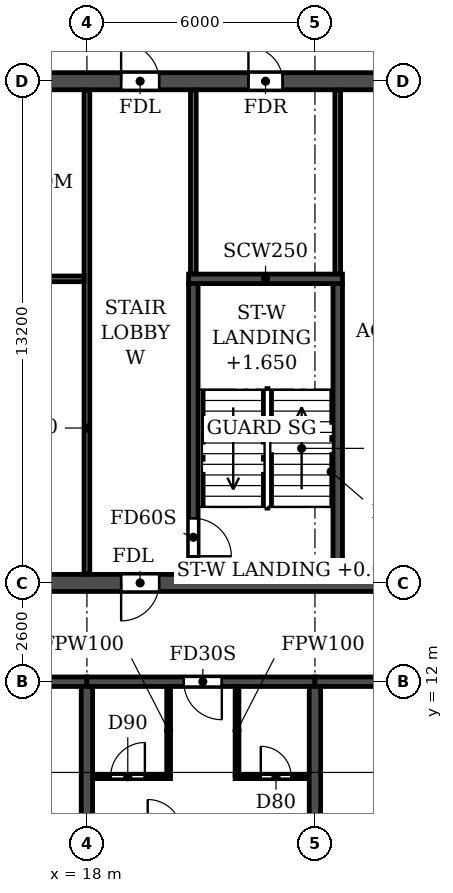
"""IFC4 building model, lengths in metres.
Left out: names, types, materials, properties, quantities, classifications, styles, units other than length and angle.
Written with IfcOpenShell. Run it as: python <this file> out.ifc"""

import sys

from ifc_helpers import new_model, si_unit, direction, frame, frame_2d, origin, place, context, subcontext, project, spatial, rectangle, extrude, element, fill, save


model = new_model("IFC4")
c1 = context("Model", 3, precision=1e-05, world=origin(), true_north=direction((0.0, 1.0)))
c2 = subcontext(c1, "Body", "Model", "MODEL_VIEW")
j1 = project(units=[si_unit("LENGTHUNIT", "METRE"), si_unit("PLANEANGLEUNIT", "RADIAN")], contexts=[c1])
p1 = place(None, origin())
s1 = spatial("IfcSite", under=j1, at=p1, CompositionType="ELEMENT")
p2 = place(p1, origin())
s2 = spatial("IfcBuilding", under=s1, at=p2, CompositionType="ELEMENT")
p3 = place(p2, frame((0.0, 0.0, 152.1)))
s3 = spatial("IfcBuildingStorey", under=s2, at=p3, CompositionType="ELEMENT", Elevation=152.1)
for number, where, z_axis, x_axis in (
    (1, (18.0, 0.2, 0.0), (0.0, 0.0, 1.0), (0.0, 1.0, 0.0)),
    (2, (24.0, 0.2, 0.0), (0.0, 0.0, 1.0), (0.0, 1.0, 0.0)),
):
    element("IfcWall", number, at=place(p3, frame(where, z_axis=z_axis, x_axis=x_axis)), inside=s3, PredefinedType="SHEAR", context=c2, shape_type="SweptSolid", body=[
        extrude(rectangle(XDim=11.675, YDim=0.3, at=frame_2d((5.837, 0.0))), origin(), (0.0, 0.0, 1.0), 3.07),
    ])
p4 = place(p3, frame((12.2, 12.0, 0.0), z_axis=(0.0, 0.0, 1.0), x_axis=(1.0, 0.0, 0.0)))
e3 = element("IfcWall", 3, at=p4, inside=s3, PredefinedType="SHEAR", context=c2, shape_type="SweptSolid", body=[
    extrude(rectangle(XDim=5.8, YDim=0.25, at=frame_2d((2.9, 0.0))), origin(), (0.0, 0.0, 1.0), 2.47),
])
p5 = place(p4, frame((2.3, 0.0, 0.0)))
e4 = element("IfcOpeningElement", 4, at=p5, cuts=e3, PredefinedType="OPENING", context=c2, shape_type="SweptSolid", body=[
    extrude(rectangle(XDim=1.0, YDim=2.1, at=frame_2d((0.5, 1.05))), frame((0.0, 0.135, 0.0), z_axis=(0.0, -1.0, 0.0), x_axis=(1.0, 0.0, 0.0)), (0.0, 0.0, 1.0), 0.27),
])
p6 = place(p3, frame((18.0, 12.0, 0.0), z_axis=(0.0, 0.0, 1.0), x_axis=(1.0, 0.0, 0.0)))
e5 = element("IfcWall", 5, at=p6, inside=s3, PredefinedType="SHEAR", context=c2, shape_type="SweptSolid", body=[
    extrude(rectangle(XDim=6.0, YDim=0.25, at=frame_2d((3.0, 0.0))), origin(), (0.0, 0.0, 1.0), 2.47),
])
p7 = place(p6, frame((2.55, 0.0, 0.0)))
e6 = element("IfcOpeningElement", 6, at=p7, cuts=e5, PredefinedType="OPENING", context=c2, shape_type="SweptSolid", body=[
    extrude(rectangle(XDim=1.0, YDim=2.1, at=frame_2d((0.5, 1.05))), frame((0.0, 0.135, 0.0), z_axis=(0.0, -1.0, 0.0), x_axis=(1.0, 0.0, 0.0)), (0.0, 0.0, 1.0), 0.27),
])
p8 = place(p3, frame((24.0, 12.0, 0.0), z_axis=(0.0, 0.0, 1.0), x_axis=(1.0, 0.0, 0.0)))
e7 = element("IfcWall", 7, at=p8, inside=s3, PredefinedType="SHEAR", context=c2, shape_type="SweptSolid", body=[
    extrude(rectangle(XDim=6.0, YDim=0.25, at=frame_2d((3.0, 0.0))), origin(), (0.0, 0.0, 1.0), 2.47),
])
p9 = place(p8, frame((2.55, 0.0, 0.0)))
e8 = element("IfcOpeningElement", 8, at=p9, cuts=e7, PredefinedType="OPENING", context=c2, shape_type="SweptSolid", body=[
    extrude(rectangle(XDim=1.0, YDim=2.1, at=frame_2d((0.5, 1.05))), frame((0.0, 0.135, 0.0), z_axis=(0.0, -1.0, 0.0), x_axis=(1.0, 0.0, 0.0)), (0.0, 0.0, 1.0), 0.27),
])
p10 = place(p3, frame((12.2, 14.6, 0.0), z_axis=(0.0, 0.0, 1.0), x_axis=(1.0, 0.0, 0.0)))
e9 = element("IfcWall", 9, at=p10, inside=s3, PredefinedType="SOLIDWALL", context=c2, shape_type="SweptSolid", body=[
    extrude(rectangle(XDim=77.6, YDim=0.45, at=frame_2d((38.8, 0.0))), origin(), (0.0, 0.0, 1.0), 3.07),
])
p11 = place(p10, frame((2.3, 0.0, 0.0)))
e10 = element("IfcOpeningElement", 10, at=p11, cuts=e9, PredefinedType="OPENING", context=c2, shape_type="SweptSolid", body=[
    extrude(rectangle(XDim=1.0, YDim=2.1, at=frame_2d((0.5, 1.05))), frame((0.0, 0.235, 0.0), z_axis=(0.0, -1.0, 0.0), x_axis=(1.0, 0.0, 0.0)), (0.0, 0.0, 1.0), 0.47),
])
p12 = place(p10, frame((6.7, 0.0, 0.0)))
e11 = element("IfcOpeningElement", 11, at=p12, cuts=e9, PredefinedType="OPENING", context=c2, shape_type="SweptSolid", body=[
    extrude(rectangle(XDim=1.0, YDim=2.1, at=frame_2d((0.5, 1.05))), frame((0.0, 0.235, 0.0), z_axis=(0.0, -1.0, 0.0), x_axis=(1.0, 0.0, 0.0)), (0.0, 0.0, 1.0), 0.47),
])
p13 = place(p10, frame((14.6, 0.0, 0.0)))
e12 = element("IfcOpeningElement", 12, at=p13, cuts=e9, PredefinedType="OPENING", context=c2, shape_type="SweptSolid", body=[
    extrude(rectangle(XDim=1.0, YDim=2.1, at=frame_2d((0.5, 1.05))), frame((0.0, 0.235, 0.0), z_axis=(0.0, -1.0, 0.0), x_axis=(1.0, 0.0, 0.0)), (0.0, 0.0, 1.0), 0.47),
])
p14 = place(p10, frame((19.2, 0.0, 0.0)))
e13 = element("IfcOpeningElement", 13, at=p14, cuts=e9, PredefinedType="OPENING", context=c2, shape_type="SweptSolid", body=[
    extrude(rectangle(XDim=1.0, YDim=2.1, at=frame_2d((0.5, 1.05))), frame((0.0, 0.235, 0.0), z_axis=(0.0, -1.0, 0.0), x_axis=(1.0, 0.0, 0.0)), (0.0, 0.0, 1.0), 0.47),
])
p15 = place(p10, frame((30.5, 0.0, 0.0)))
e14 = element("IfcOpeningElement", 14, at=p15, cuts=e9, PredefinedType="OPENING", context=c2, shape_type="SweptSolid", body=[
    extrude(rectangle(XDim=1.0, YDim=2.1, at=frame_2d((0.5, 1.05))), frame((0.0, 0.235, 0.0), z_axis=(0.0, -1.0, 0.0), x_axis=(1.0, 0.0, 0.0)), (0.0, 0.0, 1.0), 0.47),
])
p16 = place(p10, frame((34.15, 0.0, 0.0)))
e15 = element("IfcOpeningElement", 15, at=p16, cuts=e9, PredefinedType="OPENING", context=c2, shape_type="SweptSolid", body=[
    extrude(rectangle(XDim=1.5, YDim=2.1, at=frame_2d((0.75, 1.05))), frame((0.0, 0.235, 0.0), z_axis=(0.0, -1.0, 0.0), x_axis=(1.0, 0.0, 0.0)), (0.0, 0.0, 1.0), 0.47),
])
p17 = place(p10, frame((38.3, 0.0, 0.0)))
e16 = element("IfcOpeningElement", 16, at=p17, cuts=e9, PredefinedType="OPENING", context=c2, shape_type="SweptSolid", body=[
    extrude(rectangle(XDim=1.0, YDim=2.1, at=frame_2d((0.5, 1.05))), frame((0.0, 0.235, 0.0), z_axis=(0.0, -1.0, 0.0), x_axis=(1.0, 0.0, 0.0)), (0.0, 0.0, 1.0), 0.47),
])
p18 = place(p10, frame((43.5, 0.0, 0.0)))
e17 = element("IfcOpeningElement", 17, at=p18, cuts=e9, PredefinedType="OPENING", context=c2, shape_type="SweptSolid", body=[
    extrude(rectangle(XDim=1.0, YDim=2.1, at=frame_2d((0.5, 1.05))), frame((0.0, 0.235, 0.0), z_axis=(0.0, -1.0, 0.0), x_axis=(1.0, 0.0, 0.0)), (0.0, 0.0, 1.0), 0.47),
])
p19 = place(p10, frame((57.4, 0.0, 0.0)))
e18 = element("IfcOpeningElement", 18, at=p19, cuts=e9, PredefinedType="OPENING", context=c2, shape_type="SweptSolid", body=[
    extrude(rectangle(XDim=1.0, YDim=2.1, at=frame_2d((0.5, 1.05))), frame((0.0, 0.235, 0.0), z_axis=(0.0, -1.0, 0.0), x_axis=(1.0, 0.0, 0.0)), (0.0, 0.0, 1.0), 0.47),
])
p20 = place(p10, frame((62.0, 0.0, 0.0)))
e19 = element("IfcOpeningElement", 19, at=p20, cuts=e9, PredefinedType="OPENING", context=c2, shape_type="SweptSolid", body=[
    extrude(rectangle(XDim=1.0, YDim=2.1, at=frame_2d((0.5, 1.05))), frame((0.0, 0.235, 0.0), z_axis=(0.0, -1.0, 0.0), x_axis=(1.0, 0.0, 0.0)), (0.0, 0.0, 1.0), 0.47),
])
p21 = place(p10, frame((69.9, 0.0, 0.0)))
e20 = element("IfcOpeningElement", 20, at=p21, cuts=e9, PredefinedType="OPENING", context=c2, shape_type="SweptSolid", body=[
    extrude(rectangle(XDim=1.0, YDim=2.1, at=frame_2d((0.5, 1.05))), frame((0.0, 0.235, 0.0), z_axis=(0.0, -1.0, 0.0), x_axis=(1.0, 0.0, 0.0)), (0.0, 0.0, 1.0), 0.47),
])
p22 = place(p10, frame((74.3, 0.0, 0.0)))
e21 = element("IfcOpeningElement", 21, at=p22, cuts=e9, PredefinedType="OPENING", context=c2, shape_type="SweptSolid", body=[
    extrude(rectangle(XDim=1.0, YDim=2.1, at=frame_2d((0.5, 1.05))), frame((0.0, 0.235, 0.0), z_axis=(0.0, -1.0, 0.0), x_axis=(1.0, 0.0, 0.0)), (0.0, 0.0, 1.0), 0.47),
])
p23 = place(p3, frame((12.2, 27.8, 0.0), z_axis=(0.0, 0.0, 1.0), x_axis=(1.0, 0.0, 0.0)))
e22 = element("IfcWall", 22, at=p23, inside=s3, PredefinedType="SOLIDWALL", context=c2, shape_type="SweptSolid", body=[
    extrude(rectangle(XDim=77.6, YDim=0.45, at=frame_2d((38.8, 0.0))), origin(), (0.0, 0.0, 1.0), 3.07),
])
p24 = place(p23, frame((2.3, 0.0, 0.0)))
e23 = element("IfcOpeningElement", 23, at=p24, cuts=e22, PredefinedType="OPENING", context=c2, shape_type="SweptSolid", body=[
    extrude(rectangle(XDim=1.0, YDim=2.1, at=frame_2d((0.5, 1.05))), frame((0.0, 0.235, 0.0), z_axis=(0.0, -1.0, 0.0), x_axis=(1.0, 0.0, 0.0)), (0.0, 0.0, 1.0), 0.47),
])
p25 = place(p23, frame((6.7, 0.0, 0.0)))
e24 = element("IfcOpeningElement", 24, at=p25, cuts=e22, PredefinedType="OPENING", context=c2, shape_type="SweptSolid", body=[
    extrude(rectangle(XDim=1.0, YDim=2.1, at=frame_2d((0.5, 1.05))), frame((0.0, 0.235, 0.0), z_axis=(0.0, -1.0, 0.0), x_axis=(1.0, 0.0, 0.0)), (0.0, 0.0, 1.0), 0.47),
])
p26 = place(p23, frame((10.05, 0.0, 0.0)))
e25 = element("IfcOpeningElement", 25, at=p26, cuts=e22, PredefinedType="OPENING", context=c2, shape_type="SweptSolid", body=[
    extrude(rectangle(XDim=0.9, YDim=2.1, at=frame_2d((0.45, 1.05))), frame((0.0, 0.235, 0.0), z_axis=(0.0, -1.0, 0.0), x_axis=(1.0, 0.0, 0.0)), (0.0, 0.0, 1.0), 0.47),
])
p27 = place(p23, frame((19.25, 0.0, 0.0)))
e26 = element("IfcOpeningElement", 26, at=p27, cuts=e22, PredefinedType="OPENING", context=c2, shape_type="SweptSolid", body=[
    extrude(rectangle(XDim=0.9, YDim=2.1, at=frame_2d((0.45, 1.05))), frame((0.0, 0.235, 0.0), z_axis=(0.0, -1.0, 0.0), x_axis=(1.0, 0.0, 0.0)), (0.0, 0.0, 1.0), 0.47),
])
p28 = place(p23, frame((22.4, 0.0, 0.0)))
e27 = element("IfcOpeningElement", 27, at=p28, cuts=e22, PredefinedType="OPENING", context=c2, shape_type="SweptSolid", body=[
    extrude(rectangle(XDim=1.0, YDim=2.1, at=frame_2d((0.5, 1.05))), frame((0.0, 0.235, 0.0), z_axis=(0.0, -1.0, 0.0), x_axis=(1.0, 0.0, 0.0)), (0.0, 0.0, 1.0), 0.47),
])
p29 = place(p23, frame((27.6, 0.0, 0.0)))
e28 = element("IfcOpeningElement", 28, at=p29, cuts=e22, PredefinedType="OPENING", context=c2, shape_type="SweptSolid", body=[
    extrude(rectangle(XDim=1.0, YDim=2.1, at=frame_2d((0.5, 1.05))), frame((0.0, 0.235, 0.0), z_axis=(0.0, -1.0, 0.0), x_axis=(1.0, 0.0, 0.0)), (0.0, 0.0, 1.0), 0.47),
])
p30 = place(p23, frame((35.4, 0.0, 0.0)))
e29 = element("IfcOpeningElement", 29, at=p30, cuts=e22, PredefinedType="OPENING", context=c2, shape_type="SweptSolid", body=[
    extrude(rectangle(XDim=1.0, YDim=2.1, at=frame_2d((0.5, 1.05))), frame((0.0, 0.235, 0.0), z_axis=(0.0, -1.0, 0.0), x_axis=(1.0, 0.0, 0.0)), (0.0, 0.0, 1.0), 0.47),
])
p31 = place(p23, frame((38.3, 0.0, 0.0)))
e30 = element("IfcOpeningElement", 30, at=p31, cuts=e22, PredefinedType="OPENING", context=c2, shape_type="SweptSolid", body=[
    extrude(rectangle(XDim=1.0, YDim=2.1, at=frame_2d((0.5, 1.05))), frame((0.0, 0.235, 0.0), z_axis=(0.0, -1.0, 0.0), x_axis=(1.0, 0.0, 0.0)), (0.0, 0.0, 1.0), 0.47),
])
p32 = place(p23, frame((42.25, 0.0, 0.0)))
e31 = element("IfcOpeningElement", 31, at=p32, cuts=e22, PredefinedType="OPENING", context=c2, shape_type="SweptSolid", body=[
    extrude(rectangle(XDim=1.5, YDim=2.1, at=frame_2d((0.75, 1.05))), frame((0.0, 0.235, 0.0), z_axis=(0.0, -1.0, 0.0), x_axis=(1.0, 0.0, 0.0)), (0.0, 0.0, 1.0), 0.47),
])
p33 = place(p23, frame((47.7, 0.0, 0.0)))
e32 = element("IfcOpeningElement", 32, at=p33, cuts=e22, PredefinedType="OPENING", context=c2, shape_type="SweptSolid", body=[
    extrude(rectangle(XDim=1.0, YDim=2.1, at=frame_2d((0.5, 1.05))), frame((0.0, 0.235, 0.0), z_axis=(0.0, -1.0, 0.0), x_axis=(1.0, 0.0, 0.0)), (0.0, 0.0, 1.0), 0.47),
])
p34 = place(p23, frame((51.6, 0.0, 0.0)))
e33 = element("IfcOpeningElement", 33, at=p34, cuts=e22, PredefinedType="OPENING", context=c2, shape_type="SweptSolid", body=[
    extrude(rectangle(XDim=1.0, YDim=2.1, at=frame_2d((0.5, 1.05))), frame((0.0, 0.235, 0.0), z_axis=(0.0, -1.0, 0.0), x_axis=(1.0, 0.0, 0.0)), (0.0, 0.0, 1.0), 0.47),
])
p35 = place(p23, frame((54.2, 0.0, 0.0)))
e34 = element("IfcOpeningElement", 34, at=p35, cuts=e22, PredefinedType="OPENING", context=c2, shape_type="SweptSolid", body=[
    extrude(rectangle(XDim=1.0, YDim=2.1, at=frame_2d((0.5, 1.05))), frame((0.0, 0.235, 0.0), z_axis=(0.0, -1.0, 0.0), x_axis=(1.0, 0.0, 0.0)), (0.0, 0.0, 1.0), 0.47),
])
p36 = place(p23, frame((57.45, 0.0, 0.0)))
e35 = element("IfcOpeningElement", 35, at=p36, cuts=e22, PredefinedType="OPENING", context=c2, shape_type="SweptSolid", body=[
    extrude(rectangle(XDim=0.9, YDim=2.1, at=frame_2d((0.45, 1.05))), frame((0.0, 0.235, 0.0), z_axis=(0.0, -1.0, 0.0), x_axis=(1.0, 0.0, 0.0)), (0.0, 0.0, 1.0), 0.47),
])
p37 = place(p23, frame((66.65, 0.0, 0.0)))
e36 = element("IfcOpeningElement", 36, at=p37, cuts=e22, PredefinedType="OPENING", context=c2, shape_type="SweptSolid", body=[
    extrude(rectangle(XDim=0.9, YDim=2.1, at=frame_2d((0.45, 1.05))), frame((0.0, 0.235, 0.0), z_axis=(0.0, -1.0, 0.0), x_axis=(1.0, 0.0, 0.0)), (0.0, 0.0, 1.0), 0.47),
])
p38 = place(p23, frame((69.9, 0.0, 0.0)))
e37 = element("IfcOpeningElement", 37, at=p38, cuts=e22, PredefinedType="OPENING", context=c2, shape_type="SweptSolid", body=[
    extrude(rectangle(XDim=1.0, YDim=2.1, at=frame_2d((0.5, 1.05))), frame((0.0, 0.235, 0.0), z_axis=(0.0, -1.0, 0.0), x_axis=(1.0, 0.0, 0.0)), (0.0, 0.0, 1.0), 0.47),
])
p39 = place(p23, frame((74.3, 0.0, 0.0)))
e38 = element("IfcOpeningElement", 38, at=p39, cuts=e22, PredefinedType="OPENING", context=c2, shape_type="SweptSolid", body=[
    extrude(rectangle(XDim=1.0, YDim=2.1, at=frame_2d((0.5, 1.05))), frame((0.0, 0.235, 0.0), z_axis=(0.0, -1.0, 0.0), x_axis=(1.0, 0.0, 0.0)), (0.0, 0.0, 1.0), 0.47),
])
p40 = place(p3, frame((20.8, 14.825, 0.0), z_axis=(0.0, 0.0, 1.0), x_axis=(0.0, 1.0, 0.0)))
e39 = element("IfcWall", 39, at=p40, inside=s3, PredefinedType="SOLIDWALL", context=c2, shape_type="SweptSolid", body=[
    extrude(rectangle(XDim=7.65, YDim=0.25, at=frame_2d((3.825, 0.0))), origin(), (0.0, 0.0, 1.0), 3.07),
])
p41 = place(p40, frame((0.475, 0.0, 0.0)))
e40 = element("IfcOpeningElement", 40, at=p41, cuts=e39, PredefinedType="OPENING", context=c2, shape_type="SweptSolid", body=[
    extrude(rectangle(XDim=1.0, YDim=2.1, at=frame_2d((0.5, 1.05))), frame((0.0, 0.135, 0.0), z_axis=(0.0, -1.0, 0.0), x_axis=(1.0, 0.0, 0.0)), (0.0, 0.0, 1.0), 0.27),
])
p42 = place(p3, frame((24.6, 14.825, 0.0), z_axis=(0.0, 0.0, 1.0), x_axis=(0.0, 1.0, 0.0)))
e41 = element("IfcWall", 41, at=p42, inside=s3, PredefinedType="SOLIDWALL", context=c2, shape_type="SweptSolid", body=[
    extrude(rectangle(XDim=7.65, YDim=0.25, at=frame_2d((3.825, 0.0))), origin(), (0.0, 0.0, 1.0), 3.07),
])
p43 = place(p3, frame((20.675, 22.6, 0.0), z_axis=(0.0, 0.0, 1.0), x_axis=(1.0, 0.0, 0.0)))
e42 = element("IfcWall", 42, at=p43, inside=s3, PredefinedType="SOLIDWALL", context=c2, shape_type="SweptSolid", body=[
    extrude(rectangle(XDim=4.05, YDim=0.25, at=frame_2d((2.025, 0.0))), origin(), (0.0, 0.0, 1.0), 3.07),
])
p44 = place(p3, frame((18.0, 14.835, 0.0), z_axis=(0.0, 0.0, 1.0), x_axis=(0.0, 1.0, 0.0)))
e43 = element("IfcWall", 43, at=p44, inside=s3, PredefinedType="PARTITIONING", context=c2, shape_type="SweptSolid", body=[
    extrude(rectangle(XDim=12.73, YDim=0.15, at=frame_2d((6.365, 0.0))), origin(), (0.0, 0.0, 1.0), 3.07),
])
p45 = place(p3, frame((18.16, 9.5, 0.0), z_axis=(0.0, 0.0, 1.0), x_axis=(1.0, 0.0, 0.0)))
e44 = element("IfcWall", 44, at=p45, inside=s3, PredefinedType="PARTITIONING", context=c2, shape_type="SweptSolid", body=[
    extrude(rectangle(XDim=2.04, YDim=0.1, at=frame_2d((1.02, 0.0))), origin(), (0.0, 0.0, 1.0), 3.07),
])
p46 = place(p45, frame((0.465, 0.0, 0.0)))
e45 = element("IfcOpeningElement", 45, at=p46, cuts=e44, PredefinedType="OPENING", context=c2, shape_type="SweptSolid", body=[
    extrude(rectangle(XDim=0.9, YDim=2.1, at=frame_2d((0.45, 1.05))), frame((0.0, 0.06, 0.0), z_axis=(0.0, -1.0, 0.0), x_axis=(1.0, 0.0, 0.0)), (0.0, 0.0, 1.0), 0.12),
])
p47 = place(p3, frame((21.9, 9.5, 0.0), z_axis=(0.0, 0.0, 1.0), x_axis=(1.0, 0.0, 0.0)))
e46 = element("IfcWall", 46, at=p47, inside=s3, PredefinedType="PARTITIONING", context=c2, shape_type="SweptSolid", body=[
    extrude(rectangle(XDim=1.94, YDim=0.1, at=frame_2d((0.97, 0.0))), origin(), (0.0, 0.0, 1.0), 3.07),
])
p48 = place(p47, frame((0.675, 0.0, 0.0)))
e47 = element("IfcOpeningElement", 47, at=p48, cuts=e46, PredefinedType="OPENING", context=c2, shape_type="SweptSolid", body=[
    extrude(rectangle(XDim=0.8, YDim=2.1, at=frame_2d((0.4, 1.05))), frame((0.0, 0.06, 0.0), z_axis=(0.0, -1.0, 0.0), x_axis=(1.0, 0.0, 0.0)), (0.0, 0.0, 1.0), 0.12),
])
for number, where, z_axis, x_axis in (
    (48, (20.15, 9.55, 0.0), (0.0, 0.0, 1.0), (0.0, 1.0, 0.0)),
    (49, (21.95, 9.55, 0.0), (0.0, 0.0, 1.0), (0.0, 1.0, 0.0)),
):
    element("IfcWall", number, at=place(p3, frame(where, z_axis=z_axis, x_axis=x_axis)), inside=s3, PredefinedType="PARTITIONING", context=c2, shape_type="SweptSolid", body=[
        extrude(rectangle(XDim=2.315, YDim=0.1, at=frame_2d((1.157, 0.0))), origin(), (0.0, 0.0, 1.0), 3.07),
    ])
p49 = place(p3, frame((12.21, 22.6, 0.0), z_axis=(0.0, 0.0, 1.0), x_axis=(1.0, 0.0, 0.0)))
e50 = element("IfcWall", 50, at=p49, inside=s3, PredefinedType="PARTITIONING", context=c2, shape_type="SweptSolid", body=[
    extrude(rectangle(XDim=5.715, YDim=0.15, at=frame_2d((2.857, 0.0))), origin(), (0.0, 0.0, 1.0), 3.07),
])
for number, where, z_axis, x_axis in (
    (51, (20.8, 22.735, 0.0), (0.0, 0.0, 1.0), (0.0, 1.0, 0.0)),
    (52, (24.6, 22.735, 0.0), (0.0, 0.0, 1.0), (0.0, 1.0, 0.0)),
):
    element("IfcWall", number, at=place(p3, frame(where, z_axis=z_axis, x_axis=x_axis)), inside=s3, PredefinedType="PARTITIONING", context=c2, shape_type="SweptSolid", body=[
        extrude(rectangle(XDim=4.83, YDim=0.15, at=frame_2d((2.415, 0.0))), origin(), (0.0, 0.0, 1.0), 3.07),
    ])
p50 = place(p25, origin())
e53 = element("IfcDoor", 53, at=p50, inside=s3, OperationType="SINGLE_SWING_LEFT", PredefinedType="DOOR", context=c2, shape_type="SweptSolid", body=[
    extrude(rectangle(XDim=1.0, YDim=2.1, at=frame_2d((0.5, 1.05))), frame((0.0, 0.025, 0.0), z_axis=(0.0, -1.0, 0.0), x_axis=(1.0, 0.0, 0.0)), (0.0, 0.0, 1.0), 0.05),
])
fill(e24, e53)
p51 = place(p26, origin())
e54 = element("IfcDoor", 54, at=p51, inside=s3, OperationType="SINGLE_SWING_LEFT", PredefinedType="DOOR", context=c2, shape_type="SweptSolid", body=[
    extrude(rectangle(XDim=0.9, YDim=2.1, at=frame_2d((0.45, 1.05))), frame((0.0, 0.025, 0.0), z_axis=(0.0, -1.0, 0.0), x_axis=(1.0, 0.0, 0.0)), (0.0, 0.0, 1.0), 0.05),
])
fill(e25, e54)
p52 = place(p12, frame((1.0, 0.0, 0.0), z_axis=(0.0, 0.0, 1.0), x_axis=(-1.0, 0.0, 0.0)))
e55 = element("IfcDoor", 55, at=p52, inside=s3, OperationType="SINGLE_SWING_RIGHT", PredefinedType="DOOR", context=c2, shape_type="SweptSolid", body=[
    extrude(rectangle(XDim=1.0, YDim=2.1, at=frame_2d((0.5, 1.05))), frame((0.0, 0.025, 0.0), z_axis=(0.0, -1.0, 0.0), x_axis=(1.0, 0.0, 0.0)), (0.0, 0.0, 1.0), 0.05),
])
fill(e11, e55)
p53 = place(p46, origin())
e56 = element("IfcDoor", 56, at=p53, inside=s3, OperationType="SINGLE_SWING_RIGHT", PredefinedType="DOOR", context=c2, shape_type="SweptSolid", body=[
    extrude(rectangle(XDim=0.9, YDim=2.1, at=frame_2d((0.45, 1.05))), frame((0.0, 0.025, 0.0), z_axis=(0.0, -1.0, 0.0), x_axis=(1.0, 0.0, 0.0)), (0.0, 0.0, 1.0), 0.05),
])
fill(e45, e56)
p54 = place(p7, frame((1.0, 0.0, 0.0), z_axis=(0.0, 0.0, 1.0), x_axis=(-1.0, 0.0, 0.0)))
e57 = element("IfcDoor", 57, at=p54, inside=s3, OperationType="SINGLE_SWING_LEFT", PredefinedType="DOOR", context=c2, shape_type="SweptSolid", body=[
    extrude(rectangle(XDim=1.0, YDim=2.1, at=frame_2d((0.5, 1.05))), frame((0.0, 0.025, 0.0), z_axis=(0.0, -1.0, 0.0), x_axis=(1.0, 0.0, 0.0)), (0.0, 0.0, 1.0), 0.05),
])
fill(e6, e57)
p55 = place(p48, origin())
e58 = element("IfcDoor", 58, at=p55, inside=s3, OperationType="SINGLE_SWING_LEFT", PredefinedType="DOOR", context=c2, shape_type="SweptSolid", body=[
    extrude(rectangle(XDim=0.8, YDim=2.1, at=frame_2d((0.4, 1.05))), frame((0.0, 0.025, 0.0), z_axis=(0.0, -1.0, 0.0), x_axis=(1.0, 0.0, 0.0)), (0.0, 0.0, 1.0), 0.05),
])
fill(e47, e58)
p56 = place(p41, frame((1.0, 0.0, 0.0), z_axis=(0.0, 0.0, 1.0), x_axis=(-1.0, 0.0, 0.0)))
e59 = element("IfcDoor", 59, at=p56, inside=s3, OperationType="SINGLE_SWING_RIGHT", PredefinedType="DOOR", context=c2, shape_type="SweptSolid", body=[
    extrude(rectangle(XDim=1.0, YDim=2.1, at=frame_2d((0.5, 1.05))), frame((0.0, 0.025, 0.0), z_axis=(0.0, -1.0, 0.0), x_axis=(1.0, 0.0, 0.0)), (0.0, 0.0, 1.0), 0.05),
])
fill(e40, e59)
save(model, sys.argv[1])
